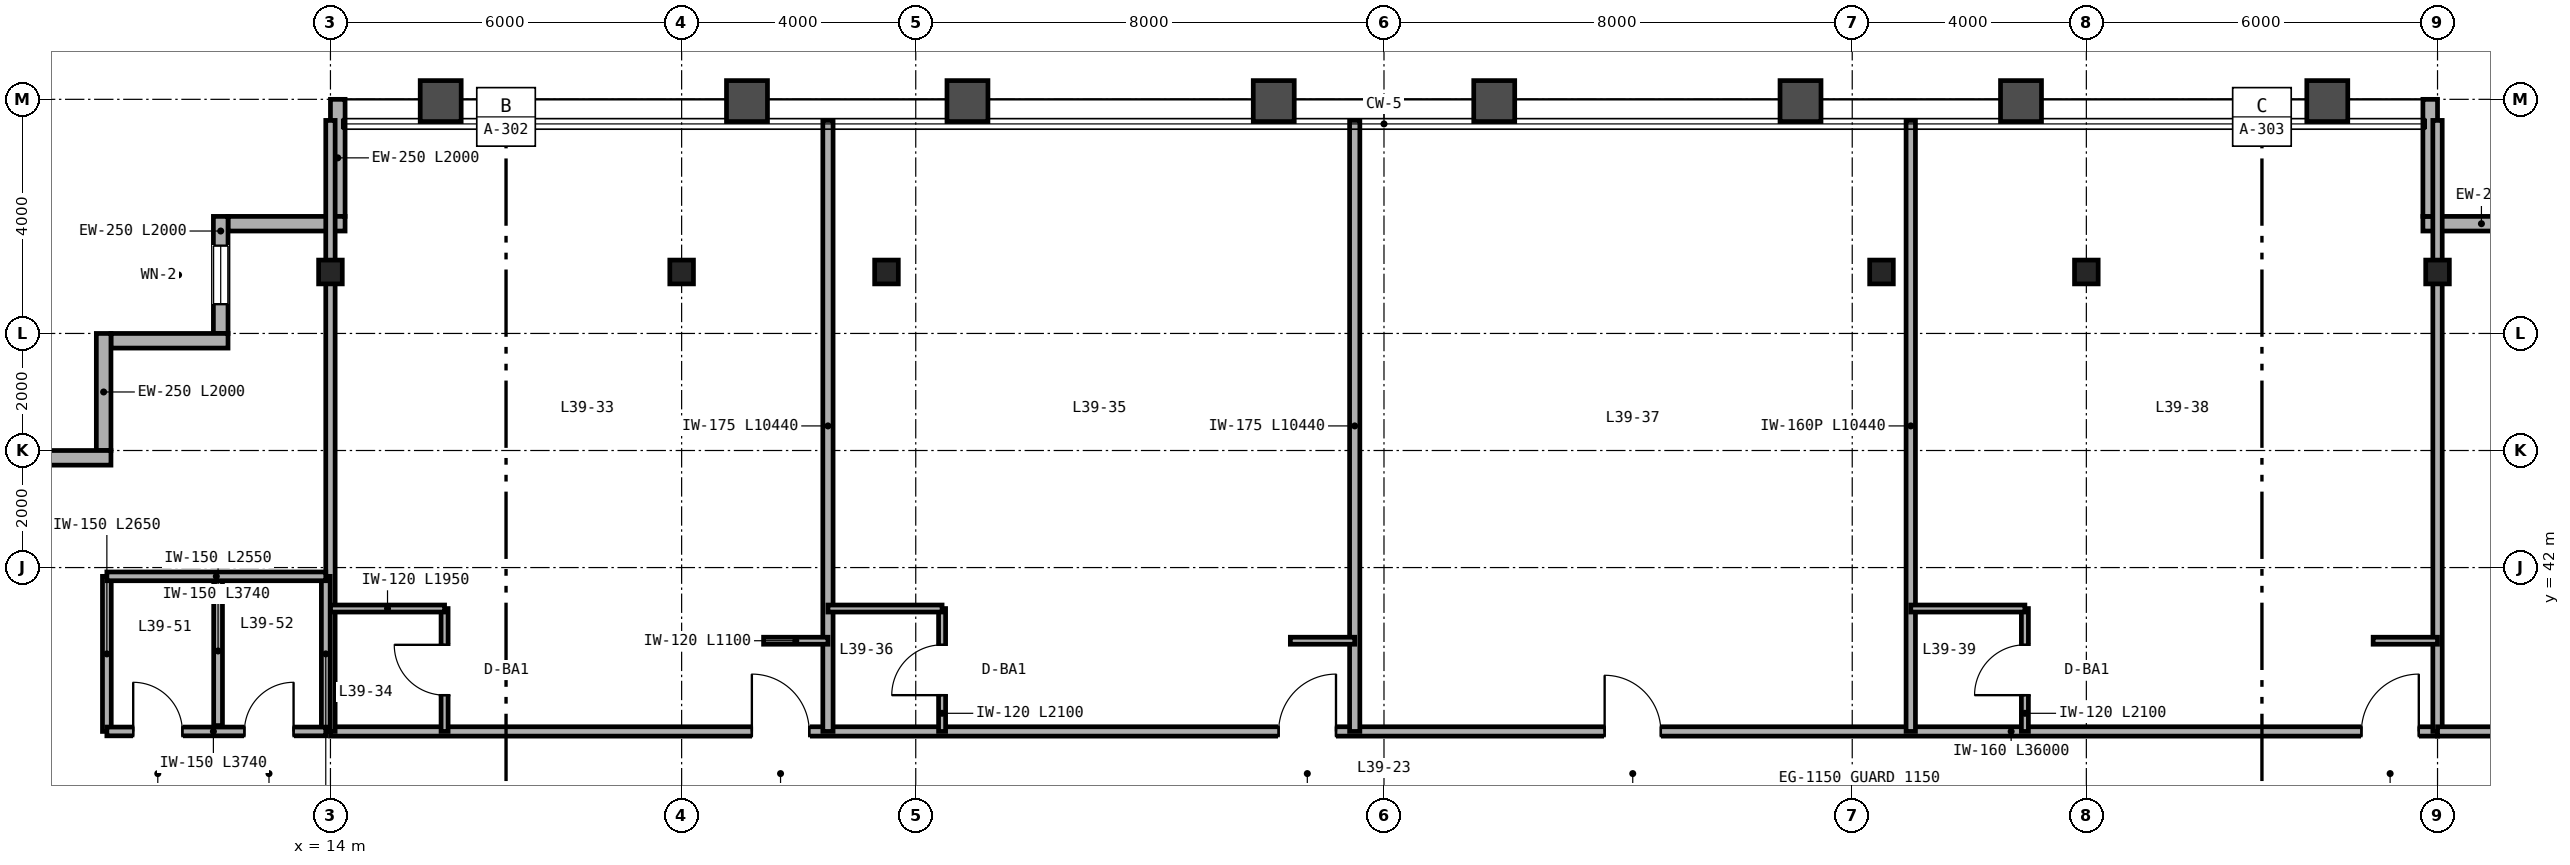
"""IFC4 building model, lengths in metres.
Left out: names, types, materials, properties, quantities, classifications, styles, units other than length and angle.
Written with IfcOpenShell. Run it as: python <this file> out.ifc"""

import sys

from ifc_helpers import new_model, si_unit, direction, frame, frame_2d, origin, origin_2d, place, context, subcontext, project, spatial, rectangle, i_section, extrude, source, transform, mapped, element, fill, save


model = new_model("IFC4")
c1 = context("Model", 3, precision=1e-05, world=origin(), true_north=direction((0.0, 1.0)))
c2 = subcontext(c1, "Body", "Model", "MODEL_VIEW")
j1 = project(units=[si_unit("LENGTHUNIT", "METRE"), si_unit("PLANEANGLEUNIT", "RADIAN")], contexts=[c1])
p1 = place(None, origin())
s1 = spatial("IfcSite", under=j1, at=p1, CompositionType="ELEMENT")
p2 = place(p1, origin())
s2 = spatial("IfcBuilding", under=s1, at=p2, CompositionType="ELEMENT")
p3 = place(p2, frame((0.0, 0.0, 158.4)))
s3 = spatial("IfcBuildingStorey", under=s2, at=p3, CompositionType="ELEMENT", Elevation=158.4)
m1 = source(origin(), c2, "Body", "SweptSolid", [
    extrude(i_section(OverallWidth=0.404, OverallDepth=0.407, WebThickness=0.027, FlangeThickness=0.044, FilletRadius=0.025, at=origin_2d()), origin(), (0.0, 0.0, 1.0), 4.989),
])
for number, where, z_axis, x_axis in (
    (1, (14.0, 47.05, 0.0), (0.0, -0.401, 0.916), (1.0, 0.0, 0.0)),
    (2, (20.0, 47.05, 0.0), (0.0, -0.401, 0.916), (1.0, 0.0, 0.0)),
    (3, (23.5, 47.05, 0.0), (0.0, -0.401, 0.916), (1.0, 0.0, 0.0)),
    (4, (40.5, 47.05, 0.0), (0.0, -0.401, 0.916), (1.0, 0.0, 0.0)),
    (5, (44.0, 47.05, 0.0), (0.0, -0.401, 0.916), (1.0, 0.0, 0.0)),
    (6, (50.0, 47.05, 0.0), (0.0, -0.401, 0.916), (1.0, 0.0, 0.0)),
):
    element("IfcColumn", number, at=place(p3, frame(where, z_axis=z_axis, x_axis=x_axis)), inside=s3, PredefinedType="COLUMN", context=c2, shape_type="MappedRepresentation", body=[
        mapped(m1, transform((0.0, 0.0, 0.0), scale=1.0)),
    ])
for number, where, z_axis, x_axis in (
    (7, (51.75, 47.875, 0.0), (0.0, 0.0, 1.0), (-1.0, 0.0, 0.0)),
    (8, (49.875, 48.0, 0.0), (0.0, 0.0, 1.0), (0.0, 1.0, 0.0)),
    (9, (14.125, 50.0, 0.0), (0.0, 0.0, 1.0), (0.0, -1.0, 0.0)),
    (10, (14.25, 47.875, 0.0), (0.0, 0.0, 1.0), (-1.0, 0.0, 0.0)),
):
    element("IfcWall", number, at=place(p3, frame(where, z_axis=z_axis, x_axis=x_axis)), inside=s3, PredefinedType="SOLIDWALL", context=c2, shape_type="SweptSolid", body=[
        extrude(rectangle(XDim=2.0, YDim=0.25, at=frame_2d((1.0, 0.0))), origin(), (0.0, 0.0, 1.0), 4.033),
    ])
p4 = place(p3, frame((12.125, 48.0, 0.0), z_axis=(0.0, 0.0, 1.0), x_axis=(0.0, -1.0, 0.0)))
e11 = element("IfcWall", 11, at=p4, inside=s3, PredefinedType="SOLIDWALL", context=c2, shape_type="SweptSolid", body=[
    extrude(rectangle(XDim=2.0, YDim=0.25, at=frame_2d((1.0, 0.0))), origin(), (0.0, 0.0, 1.0), 4.57),
])
p5 = place(p4, frame((0.5, 0.0, 0.85)))
e12 = element("IfcOpeningElement", 12, at=p5, cuts=e11, PredefinedType="OPENING", context=c2, shape_type="SweptSolid", body=[
    extrude(rectangle(XDim=1.0, YDim=1.9, at=frame_2d((0.5, 0.95))), frame((0.0, 0.135, 0.0), z_axis=(0.0, -1.0, 0.0), x_axis=(1.0, 0.0, 0.0)), (0.0, 0.0, 1.0), 0.27),
])
for number, where, z_axis, x_axis in (
    (13, (12.25, 45.875, 0.0), (0.0, 0.0, 1.0), (-1.0, 0.0, 0.0)),
    (14, (10.125, 46.0, 0.0), (0.0, 0.0, 1.0), (0.0, -1.0, 0.0)),
):
    element("IfcWall", number, at=place(p3, frame(where, z_axis=z_axis, x_axis=x_axis)), inside=s3, PredefinedType="SOLIDWALL", context=c2, shape_type="SweptSolid", body=[
        extrude(rectangle(XDim=2.0, YDim=0.25, at=frame_2d((1.0, 0.0))), origin(), (0.0, 0.0, 1.0), 4.57),
    ])
p6 = place(p3, frame((10.25, 43.875, 0.0), z_axis=(0.0, 0.0, 1.0), x_axis=(-1.0, 0.0, 0.0)))
e15 = element("IfcWall", 15, at=p6, inside=s3, PredefinedType="SOLIDWALL", context=c2, shape_type="SweptSolid", body=[
    extrude(rectangle(XDim=2.25, YDim=0.25, at=frame_2d((1.125, 0.0))), origin(), (0.0, 0.0, 1.0), 4.57),
])
p7 = place(p3, frame((14.0, 39.2, 0.0), z_axis=(0.0, 0.0, 1.0), x_axis=(1.0, 0.0, 0.0)))
e16 = element("IfcWall", 16, at=p7, inside=s3, PredefinedType="PARTITIONING", context=c2, shape_type="SweptSolid", body=[
    extrude(rectangle(XDim=36.0, YDim=0.16, at=frame_2d((18.0, 0.0))), origin(), (0.0, 0.0, 1.0), 4.113),
])
p8 = place(p7, frame((7.2, 0.0, 0.0)))
e17 = element("IfcOpeningElement", 17, at=p8, cuts=e16, PredefinedType="OPENING", context=c2, shape_type="SweptSolid", body=[
    extrude(rectangle(XDim=0.98, YDim=2.2, at=frame_2d((0.49, 1.1))), frame((0.0, 0.09, 0.0), z_axis=(0.0, -1.0, 0.0), x_axis=(1.0, 0.0, 0.0)), (0.0, 0.0, 1.0), 0.18),
])
p9 = place(p7, frame((16.2, 0.0, 0.0)))
e18 = element("IfcOpeningElement", 18, at=p9, cuts=e16, PredefinedType="OPENING", context=c2, shape_type="SweptSolid", body=[
    extrude(rectangle(XDim=0.98, YDim=2.2, at=frame_2d((0.49, 1.1))), frame((0.0, 0.09, 0.0), z_axis=(0.0, -1.0, 0.0), x_axis=(1.0, 0.0, 0.0)), (0.0, 0.0, 1.0), 0.18),
])
p10 = place(p7, frame((21.77, 0.0, 0.0)))
e19 = element("IfcOpeningElement", 19, at=p10, cuts=e16, PredefinedType="OPENING", context=c2, shape_type="SweptSolid", body=[
    extrude(rectangle(XDim=0.96, YDim=2.15, at=frame_2d((0.48, 1.075))), frame((0.0, 0.09, 0.0), z_axis=(0.0, -1.0, 0.0), x_axis=(1.0, 0.0, 0.0)), (0.0, 0.0, 1.0), 0.18),
])
p11 = place(p7, frame((34.7, 0.0, 0.0)))
e20 = element("IfcOpeningElement", 20, at=p11, cuts=e16, PredefinedType="OPENING", context=c2, shape_type="SweptSolid", body=[
    extrude(rectangle(XDim=0.98, YDim=2.2, at=frame_2d((0.49, 1.1))), frame((0.0, 0.09, 0.0), z_axis=(0.0, -1.0, 0.0), x_axis=(1.0, 0.0, 0.0)), (0.0, 0.0, 1.0), 0.18),
])
for number, where, z_axis, x_axis in (
    (21, (14.0, 39.2, 0.0), (0.0, 0.0, 1.0), (0.0, 1.0, 0.0)),
    (22, (50.0, 39.2, 0.0), (0.0, 0.0, 1.0), (0.0, 1.0, 0.0)),
):
    element("IfcWall", number, at=place(p3, frame(where, z_axis=z_axis, x_axis=x_axis)), inside=s3, PredefinedType="PARTITIONING", context=c2, shape_type="SweptSolid", body=[
        extrude(rectangle(XDim=10.44, YDim=0.16, at=frame_2d((5.22, 0.0))), origin(), (0.0, 0.0, 1.0), 3.877),
    ])
p12 = place(p3, frame((22.5, 39.2, 0.0), z_axis=(0.0, 0.0, 1.0), x_axis=(0.0, 1.0, 0.0)))
e23 = element("IfcWall", 23, at=p12, inside=s3, PredefinedType="PARTITIONING", context=c2, shape_type="SweptSolid", body=[
    extrude(rectangle(XDim=10.44, YDim=0.175, at=frame_2d((5.22, 0.0))), origin(), (0.0, 0.0, 1.0), 4.033),
])
p13 = place(p3, frame((15.95, 39.2, 0.0), z_axis=(0.0, 0.0, 1.0), x_axis=(0.0, 1.0, 0.0)))
e24 = element("IfcWall", 24, at=p13, inside=s3, PredefinedType="PARTITIONING", context=c2, shape_type="SweptSolid", body=[
    extrude(rectangle(XDim=2.1, YDim=0.12, at=frame_2d((1.05, 0.0))), origin(), (0.0, 0.0, 1.0), 4.57),
])
p14 = place(p13, frame((0.62, 0.0, 0.0)))
e25 = element("IfcOpeningElement", 25, at=p14, cuts=e24, PredefinedType="OPENING", context=c2, shape_type="SweptSolid", body=[
    extrude(rectangle(XDim=0.86, YDim=2.1, at=frame_2d((0.43, 1.05))), frame((0.0, 0.07, 0.0), z_axis=(0.0, -1.0, 0.0), x_axis=(1.0, 0.0, 0.0)), (0.0, 0.0, 1.0), 0.14),
])
p15 = place(p3, frame((14.0, 41.3, 0.0), z_axis=(0.0, 0.0, 1.0), x_axis=(1.0, 0.0, 0.0)))
e26 = element("IfcWall", 26, at=p15, inside=s3, PredefinedType="PARTITIONING", context=c2, shape_type="SweptSolid", body=[
    extrude(rectangle(XDim=1.95, YDim=0.12, at=frame_2d((0.975, 0.0))), origin(), (0.0, 0.0, 1.0), 4.57),
])
p16 = place(p3, frame((21.4, 40.75, 0.0), z_axis=(0.0, 0.0, 1.0), x_axis=(1.0, 0.0, 0.0)))
e27 = element("IfcWall", 27, at=p16, inside=s3, PredefinedType="PARTITIONING", context=c2, shape_type="SweptSolid", body=[
    extrude(rectangle(XDim=1.1, YDim=0.12, at=frame_2d((0.55, 0.0))), origin(), (0.0, 0.0, 1.0), 4.57),
])
p17 = place(p3, frame((31.5, 39.2, 0.0), z_axis=(0.0, 0.0, 1.0), x_axis=(0.0, 1.0, 0.0)))
e28 = element("IfcWall", 28, at=p17, inside=s3, PredefinedType="PARTITIONING", context=c2, shape_type="SweptSolid", body=[
    extrude(rectangle(XDim=10.44, YDim=0.175, at=frame_2d((5.22, 0.0))), origin(), (0.0, 0.0, 1.0), 3.643),
])
p18 = place(p3, frame((24.45, 39.2, 0.0), z_axis=(0.0, 0.0, 1.0), x_axis=(0.0, 1.0, 0.0)))
e29 = element("IfcWall", 29, at=p18, inside=s3, PredefinedType="PARTITIONING", context=c2, shape_type="SweptSolid", body=[
    extrude(rectangle(XDim=2.1, YDim=0.12, at=frame_2d((1.05, 0.0))), origin(), (0.0, 0.0, 1.0), 4.57),
])
p19 = place(p18, frame((0.62, 0.0, 0.0)))
e30 = element("IfcOpeningElement", 30, at=p19, cuts=e29, PredefinedType="OPENING", context=c2, shape_type="SweptSolid", body=[
    extrude(rectangle(XDim=0.86, YDim=2.1, at=frame_2d((0.43, 1.05))), frame((0.0, 0.07, 0.0), z_axis=(0.0, -1.0, 0.0), x_axis=(1.0, 0.0, 0.0)), (0.0, 0.0, 1.0), 0.14),
])
p20 = place(p3, frame((22.5, 41.3, 0.0), z_axis=(0.0, 0.0, 1.0), x_axis=(1.0, 0.0, 0.0)))
e31 = element("IfcWall", 31, at=p20, inside=s3, PredefinedType="PARTITIONING", context=c2, shape_type="SweptSolid", body=[
    extrude(rectangle(XDim=1.95, YDim=0.12, at=frame_2d((0.975, 0.0))), origin(), (0.0, 0.0, 1.0), 4.113),
])
p21 = place(p3, frame((30.4, 40.75, 0.0), z_axis=(0.0, 0.0, 1.0), x_axis=(1.0, 0.0, 0.0)))
e32 = element("IfcWall", 32, at=p21, inside=s3, PredefinedType="PARTITIONING", context=c2, shape_type="SweptSolid", body=[
    extrude(rectangle(XDim=1.1, YDim=0.12, at=frame_2d((0.55, 0.0))), origin(), (0.0, 0.0, 1.0), 4.57),
])
p22 = place(p3, frame((41.0, 39.2, 0.0), z_axis=(0.0, 0.0, 1.0), x_axis=(0.0, 1.0, 0.0)))
e33 = element("IfcWall", 33, at=p22, inside=s3, PredefinedType="PARTITIONING", context=c2, shape_type="SweptSolid", body=[
    extrude(rectangle(XDim=10.44, YDim=0.16, at=frame_2d((5.22, 0.0))), origin(), (0.0, 0.0, 1.0), 4.033),
])
p23 = place(p3, frame((42.95, 39.2, 0.0), z_axis=(0.0, 0.0, 1.0), x_axis=(0.0, 1.0, 0.0)))
e34 = element("IfcWall", 34, at=p23, inside=s3, PredefinedType="PARTITIONING", context=c2, shape_type="SweptSolid", body=[
    extrude(rectangle(XDim=2.1, YDim=0.12, at=frame_2d((1.05, 0.0))), origin(), (0.0, 0.0, 1.0), 4.57),
])
p24 = place(p23, frame((0.62, 0.0, 0.0)))
e35 = element("IfcOpeningElement", 35, at=p24, cuts=e34, PredefinedType="OPENING", context=c2, shape_type="SweptSolid", body=[
    extrude(rectangle(XDim=0.86, YDim=2.1, at=frame_2d((0.43, 1.05))), frame((0.0, 0.07, 0.0), z_axis=(0.0, -1.0, 0.0), x_axis=(1.0, 0.0, 0.0)), (0.0, 0.0, 1.0), 0.14),
])
p25 = place(p3, frame((41.0, 41.3, 0.0), z_axis=(0.0, 0.0, 1.0), x_axis=(1.0, 0.0, 0.0)))
e36 = element("IfcWall", 36, at=p25, inside=s3, PredefinedType="PARTITIONING", context=c2, shape_type="SweptSolid", body=[
    extrude(rectangle(XDim=1.95, YDim=0.12, at=frame_2d((0.975, 0.0))), origin(), (0.0, 0.0, 1.0), 4.57),
])
p26 = place(p3, frame((48.9, 40.75, 0.0), z_axis=(0.0, 0.0, 1.0), x_axis=(1.0, 0.0, 0.0)))
e37 = element("IfcWall", 37, at=p26, inside=s3, PredefinedType="PARTITIONING", context=c2, shape_type="SweptSolid", body=[
    extrude(rectangle(XDim=1.1, YDim=0.12, at=frame_2d((0.55, 0.0))), origin(), (0.0, 0.0, 1.0), 4.57),
])
p27 = place(p3, frame((50.0, 39.2, 0.0), z_axis=(0.0, 0.0, 1.0), x_axis=(1.0, 0.0, 0.0)))
e38 = element("IfcWall", 38, at=p27, inside=s3, PredefinedType="PARTITIONING", context=c2, shape_type="SweptSolid", body=[
    extrude(rectangle(XDim=5.62, YDim=0.16, at=frame_2d((2.81, 0.0))), origin(), (0.0, 0.0, 1.0), 4.57),
])
p28 = place(p27, frame((1.8, 0.0, 0.0)))
e39 = element("IfcOpeningElement", 39, at=p28, cuts=e38, PredefinedType="OPENING", context=c2, shape_type="SweptSolid", body=[
    extrude(rectangle(XDim=0.96, YDim=2.15, at=frame_2d((0.48, 1.075))), frame((0.0, 0.09, 0.0), z_axis=(0.0, -1.0, 0.0), x_axis=(1.0, 0.0, 0.0)), (0.0, 0.0, 1.0), 0.18),
])
p29 = place(p3, frame((12.08, 39.3, 0.0), z_axis=(0.0, 0.0, 1.0), x_axis=(0.0, 1.0, 0.0)))
e40 = element("IfcWall", 40, at=p29, inside=s3, PredefinedType="PARTITIONING", context=c2, shape_type="SweptSolid", body=[
    extrude(rectangle(XDim=2.55, YDim=0.15, at=frame_2d((1.275, 0.0))), origin(), (0.0, 0.0, 1.0), 4.57),
])
for number, where, z_axis, x_axis in (
    (41, (10.18, 39.2, 0.0), (0.0, 0.0, 1.0), (0.0, 1.0, 0.0)),
    (42, (13.92, 39.2, 0.0), (0.0, 0.0, 1.0), (0.0, 1.0, 0.0)),
):
    element("IfcWall", number, at=place(p3, frame(where, z_axis=z_axis, x_axis=x_axis)), inside=s3, PredefinedType="PARTITIONING", context=c2, shape_type="SweptSolid", body=[
        extrude(rectangle(XDim=2.65, YDim=0.15, at=frame_2d((1.325, 0.0))), origin(), (0.0, 0.0, 1.0), 4.57),
    ])
p30 = place(p3, frame((10.18, 41.85, 0.0), z_axis=(0.0, 0.0, 1.0), x_axis=(1.0, 0.0, 0.0)))
e43 = element("IfcWall", 43, at=p30, inside=s3, PredefinedType="PARTITIONING", context=c2, shape_type="SweptSolid", body=[
    extrude(rectangle(XDim=3.74, YDim=0.15, at=frame_2d((1.87, 0.0))), origin(), (0.0, 0.0, 1.0), 4.57),
])
p31 = place(p3, frame((10.18, 39.2, 0.0), z_axis=(0.0, 0.0, 1.0), x_axis=(1.0, 0.0, 0.0)))
e44 = element("IfcWall", 44, at=p31, inside=s3, PredefinedType="PARTITIONING", context=c2, shape_type="SweptSolid", body=[
    extrude(rectangle(XDim=3.74, YDim=0.15, at=frame_2d((1.87, 0.0))), origin(), (0.0, 0.0, 1.0), 4.57),
])
p32 = place(p31, frame((0.45, 0.0, 0.0)))
e45 = element("IfcOpeningElement", 45, at=p32, cuts=e44, PredefinedType="OPENING", context=c2, shape_type="SweptSolid", body=[
    extrude(rectangle(XDim=0.84, YDim=2.1, at=frame_2d((0.42, 1.05))), frame((0.0, 0.085, 0.0), z_axis=(0.0, -1.0, 0.0), x_axis=(1.0, 0.0, 0.0)), (0.0, 0.0, 1.0), 0.17),
])
p33 = place(p31, frame((2.35, 0.0, 0.0)))
e46 = element("IfcOpeningElement", 46, at=p33, cuts=e44, PredefinedType="OPENING", context=c2, shape_type="SweptSolid", body=[
    extrude(rectangle(XDim=0.84, YDim=2.1, at=frame_2d((0.42, 1.05))), frame((0.0, 0.085, 0.0), z_axis=(0.0, -1.0, 0.0), x_axis=(1.0, 0.0, 0.0)), (0.0, 0.0, 1.0), 0.17),
])
m2 = source(origin(), c2, "Body", "SweptSolid", [
    extrude(rectangle(XDim=1.0, YDim=1.9, at=frame_2d((0.5, 0.95))), frame((0.0, 0.03, 0.0), z_axis=(0.0, -1.0, 0.0), x_axis=(1.0, 0.0, 0.0)), (0.0, 0.0, 1.0), 0.06),
])
p34 = place(p5, origin())
e47 = element("IfcWindow", 47, at=p34, inside=s3, PartitioningType="SINGLE_PANEL", PredefinedType="WINDOW", context=c2, shape_type="MappedRepresentation", body=[
    mapped(m2, transform((0.0, 0.0, 0.0), scale=1.0)),
])
fill(e12, e47)
m3 = source(origin(), c2, "Body", "SweptSolid", [
    extrude(rectangle(XDim=0.86, YDim=2.1, at=frame_2d((0.43, 1.05))), frame((0.0, 0.025, 0.0), z_axis=(0.0, -1.0, 0.0), x_axis=(1.0, 0.0, 0.0)), (0.0, 0.0, 1.0), 0.05),
])
p35 = place(p14, origin())
e48 = element("IfcDoor", 48, at=p35, inside=s3, OperationType="SINGLE_SWING_RIGHT", PredefinedType="DOOR", context=c2, shape_type="MappedRepresentation", body=[
    mapped(m3, transform((0.0, 0.0, 0.0), scale=1.0)),
])
fill(e25, e48)
p36 = place(p19, origin())
e49 = element("IfcDoor", 49, at=p36, inside=s3, OperationType="SINGLE_SWING_LEFT", PredefinedType="DOOR", context=c2, shape_type="MappedRepresentation", body=[
    mapped(m3, transform((0.0, 0.0, 0.0), scale=1.0)),
])
fill(e30, e49)
p37 = place(p24, origin())
e50 = element("IfcDoor", 50, at=p37, inside=s3, OperationType="SINGLE_SWING_LEFT", PredefinedType="DOOR", context=c2, shape_type="MappedRepresentation", body=[
    mapped(m3, transform((0.0, 0.0, 0.0), scale=1.0)),
])
fill(e35, e50)
m4 = source(origin(), c2, "Body", "SweptSolid", [
    extrude(rectangle(XDim=0.98, YDim=2.2, at=frame_2d((0.49, 1.1))), frame((0.0, 0.025, 0.0), z_axis=(0.0, -1.0, 0.0), x_axis=(1.0, 0.0, 0.0)), (0.0, 0.0, 1.0), 0.05),
])
p38 = place(p8, origin())
e51 = element("IfcDoor", 51, at=p38, inside=s3, OperationType="SINGLE_SWING_LEFT", PredefinedType="DOOR", context=c2, shape_type="MappedRepresentation", body=[
    mapped(m4, transform((0.0, 0.0, 0.0), scale=1.0)),
])
fill(e17, e51)
p39 = place(p9, origin())
e52 = element("IfcDoor", 52, at=p39, inside=s3, OperationType="SINGLE_SWING_RIGHT", PredefinedType="DOOR", context=c2, shape_type="MappedRepresentation", body=[
    mapped(m4, transform((0.0, 0.0, 0.0), scale=1.0)),
])
fill(e18, e52)
m5 = source(origin(), c2, "Body", "SweptSolid", [
    extrude(rectangle(XDim=0.96, YDim=2.15, at=frame_2d((0.48, 1.075))), frame((0.0, 0.025, 0.0), z_axis=(0.0, -1.0, 0.0), x_axis=(1.0, 0.0, 0.0)), (0.0, 0.0, 1.0), 0.05),
])
p40 = place(p10, origin())
e53 = element("IfcDoor", 53, at=p40, inside=s3, OperationType="SINGLE_SWING_LEFT", PredefinedType="DOOR", context=c2, shape_type="MappedRepresentation", body=[
    mapped(m5, transform((0.0, 0.0, 0.0), scale=1.0)),
])
fill(e19, e53)
p41 = place(p11, origin())
e54 = element("IfcDoor", 54, at=p41, inside=s3, OperationType="SINGLE_SWING_RIGHT", PredefinedType="DOOR", context=c2, shape_type="MappedRepresentation", body=[
    mapped(m4, transform((0.0, 0.0, 0.0), scale=1.0)),
])
fill(e20, e54)
m6 = source(origin(), c2, "Body", "SweptSolid", [
    extrude(rectangle(XDim=0.84, YDim=2.1, at=frame_2d((0.42, 1.05))), frame((0.0, 0.025, 0.0), z_axis=(0.0, -1.0, 0.0), x_axis=(1.0, 0.0, 0.0)), (0.0, 0.0, 1.0), 0.05),
])
p42 = place(p32, origin())
e55 = element("IfcDoor", 55, at=p42, inside=s3, OperationType="SINGLE_SWING_LEFT", PredefinedType="DOOR", context=c2, shape_type="MappedRepresentation", body=[
    mapped(m6, transform((0.0, 0.0, 0.0), scale=1.0)),
])
fill(e45, e55)
p43 = place(p33, origin())
e56 = element("IfcDoor", 56, at=p43, inside=s3, OperationType="SINGLE_SWING_RIGHT", PredefinedType="DOOR", context=c2, shape_type="MappedRepresentation", body=[
    mapped(m6, transform((0.0, 0.0, 0.0), scale=1.0)),
])
fill(e46, e56)
save(model, sys.argv[1])
